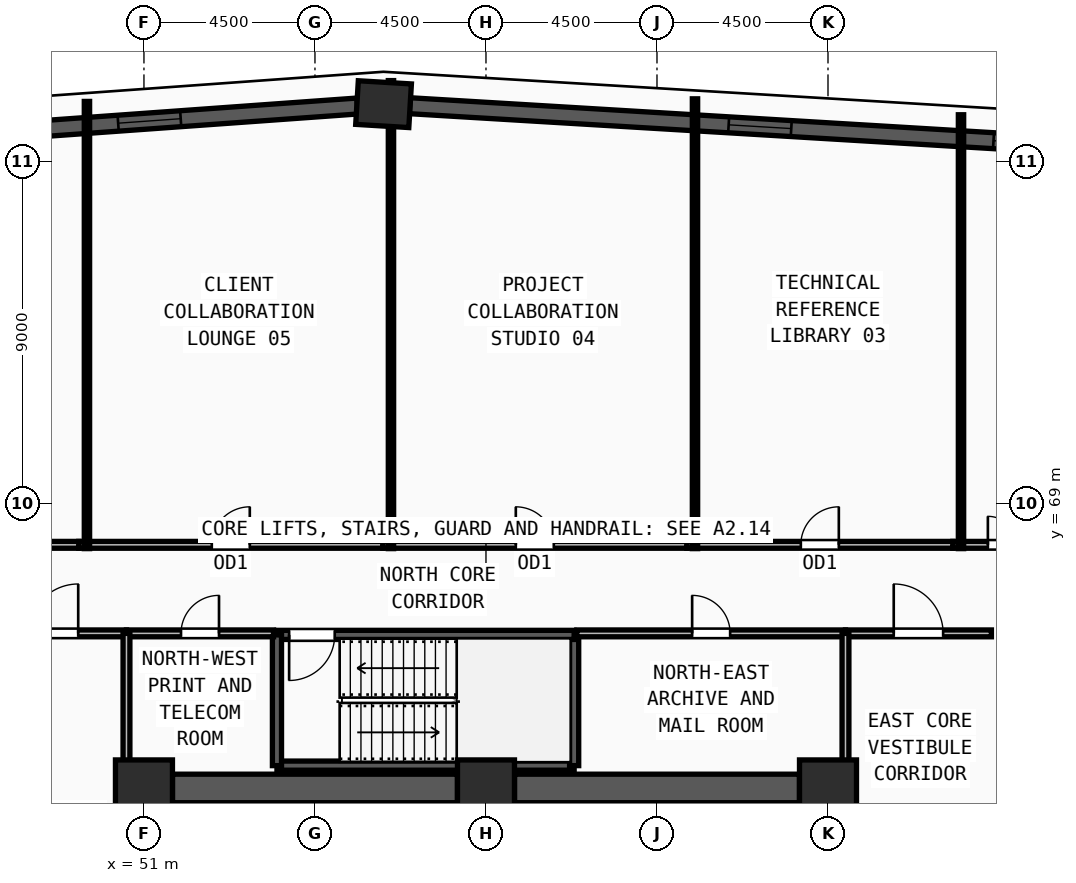
"""IFC4 building model, lengths in metres.
Left out: names, types, materials, properties, quantities, classifications, styles, units other than length and angle.
Written with IfcOpenShell. Run it as: python <this file> out.ifc"""

import sys

from ifc_helpers import new_model, si_unit, direction, frame, frame_2d, origin, origin_2d, place, context, subcontext, project, spatial, rectangle, extrude, source, transform, mapped, element, fill, save


model = new_model("IFC4")
c1 = context("Model", 3, precision=1e-05, world=origin(), true_north=direction((0.0, 1.0)))
c2 = subcontext(c1, "Body", "Model", "MODEL_VIEW")
j1 = project(units=[si_unit("LENGTHUNIT", "METRE"), si_unit("PLANEANGLEUNIT", "RADIAN")], contexts=[c1])
p1 = place(None, origin())
s1 = spatial("IfcSite", under=j1, at=p1, CompositionType="ELEMENT")
p2 = place(p1, origin())
s2 = spatial("IfcBuilding", under=s1, at=p2, CompositionType="ELEMENT")
p3 = place(p2, frame((0.0, 0.0, 155.25)))
s3 = spatial("IfcBuildingStorey", under=s2, at=p3, CompositionType="ELEMENT", Elevation=155.25)
m1 = source(origin(), c2, "Body", "SweptSolid", [
    extrude(rectangle(XDim=1.5, YDim=1.5, at=origin_2d()), origin(), (0.0, 0.0, 1.0), 3.75),
])
for number, where, z_axis, x_axis in (
    (1, (69.0, 61.5, 0.0), (0.0, 0.0, 1.0), (1.0, 0.0, 0.0)),
    (2, (60.0, 61.5, 0.0), (0.0, 0.0, 1.0), (1.0, 0.0, 0.0)),
    (3, (51.0, 61.5, 0.0), (0.0, 0.0, 1.0), (1.0, 0.0, 0.0)),
):
    element("IfcColumn", number, at=place(p3, frame(where, z_axis=z_axis, x_axis=x_axis)), inside=s3, PredefinedType="COLUMN", context=c2, shape_type="MappedRepresentation", body=[
        mapped(m1, transform((0.0, 0.0, 0.0), x_axis=(1.0, 0.0, 0.0), y_axis=(0.0, 1.0, 0.0), z_axis=(0.0, 0.0, 1.0), scale=1.0)),
    ])
m2 = source(origin(), c2, "Body", "SweptSolid", [
    extrude(rectangle(XDim=1.4, YDim=1.15, at=origin_2d()), origin(), (0.0, 0.0, 1.0), 3.75),
])
p4 = place(p3, frame((57.305, 79.505, 0.0), z_axis=(0.0, 0.0, 1.0), x_axis=(-0.998208638344, 0.059829042574, 0.0)))
e4 = element("IfcColumn", 4, at=p4, inside=s3, PredefinedType="COLUMN", context=c2, shape_type="MappedRepresentation", body=[
    mapped(m2, transform((0.0, 0.0, 0.0), x_axis=(1.0, 0.0, 0.0), y_axis=(0.0, 1.0, 0.0), z_axis=(0.0, 0.0, 1.0), scale=1.0)),
])
p5 = place(p3, frame((88.668, 77.626, 0.0), z_axis=(0.0, 0.0, 1.0), x_axis=(-0.998209336024, 0.059817401095, 0.0)))
e5 = element("IfcWall", 5, at=p5, inside=s3, PredefinedType="SOLIDWALL", context=c2, shape_type="SweptSolid", body=[
    extrude(rectangle(XDim=30.729, YDim=0.42, at=frame_2d((15.365, 0.0))), origin(), (0.0, 0.0, 1.0), 3.57),
])
m3 = source(origin(), c2, "Body", "SweptSolid", [
    extrude(rectangle(XDim=1.65, YDim=1.95, at=frame_2d((0.825, 0.975))), frame((0.0, 0.22, 0.0), z_axis=(0.0, -1.0, 0.0), x_axis=(1.0, 0.0, 0.0)), (0.0, 0.0, 1.0), 0.44),
])
p6 = place(p5, frame((6.857, 0.0, 0.55)))
e6 = element("IfcOpeningElement", 6, at=p6, cuts=e5, PredefinedType="OPENING", context=c2, shape_type="MappedRepresentation", body=[
    mapped(m3, transform((0.0, 0.0, 0.0), x_axis=(1.0, 0.0, 0.0), y_axis=(0.0, 1.0, 0.0), z_axis=(0.0, 0.0, 1.0), scale=1.0)),
])
p7 = place(p5, frame((13.69, 0.0, 0.55)))
e7 = element("IfcOpeningElement", 7, at=p7, cuts=e5, PredefinedType="OPENING", context=c2, shape_type="MappedRepresentation", body=[
    mapped(m3, transform((0.0, 0.0, 0.0), x_axis=(1.0, 0.0, 0.0), y_axis=(0.0, 1.0, 0.0), z_axis=(0.0, 0.0, 1.0), scale=1.0)),
])
p8 = place(p5, frame((20.672, 0.0, 0.55)))
e8 = element("IfcOpeningElement", 8, at=p8, cuts=e5, PredefinedType="OPENING", context=c2, shape_type="MappedRepresentation", body=[
    mapped(m3, transform((0.0, 0.0, 0.0), x_axis=(1.0, 0.0, 0.0), y_axis=(0.0, 1.0, 0.0), z_axis=(0.0, 0.0, 1.0), scale=1.0)),
])
p9 = place(p3, frame((56.617, 79.456, 0.0), z_axis=(0.0, 0.0, 1.0), x_axis=(-0.997433557859, -0.071598167967, 0.0)))
e9 = element("IfcWall", 9, at=p9, inside=s3, PredefinedType="SOLIDWALL", context=c2, shape_type="SweptSolid", body=[
    extrude(rectangle(XDim=25.349, YDim=0.42, at=frame_2d((12.674, 0.0))), origin(), (0.0, 0.0, 1.0), 3.57),
])
p10 = place(p9, frame((4.662, 0.0, 0.55)))
e10 = element("IfcOpeningElement", 10, at=p10, cuts=e9, PredefinedType="OPENING", context=c2, shape_type="MappedRepresentation", body=[
    mapped(m3, transform((0.0, 0.0, 0.0), x_axis=(1.0, 0.0, 0.0), y_axis=(0.0, 1.0, 0.0), z_axis=(0.0, 0.0, 1.0), scale=1.0)),
])
p11 = place(p9, frame((11.85, 0.0, 0.55)))
e11 = element("IfcOpeningElement", 11, at=p11, cuts=e9, PredefinedType="OPENING", context=c2, shape_type="MappedRepresentation", body=[
    mapped(m3, transform((0.0, 0.0, 0.0), x_axis=(1.0, 0.0, 0.0), y_axis=(0.0, 1.0, 0.0), z_axis=(0.0, 0.0, 1.0), scale=1.0)),
])
p12 = place(p9, frame((18.187, 0.0, 0.55)))
e12 = element("IfcOpeningElement", 12, at=p12, cuts=e9, PredefinedType="OPENING", context=c2, shape_type="MappedRepresentation", body=[
    mapped(m3, transform((0.0, 0.0, 0.0), x_axis=(1.0, 0.0, 0.0), y_axis=(0.0, 1.0, 0.0), z_axis=(0.0, 0.0, 1.0), scale=1.0)),
])
for number, where, z_axis, x_axis in (
    (13, (51.75, 61.5, 0.0), (0.0, 0.0, 1.0), (1.0, 0.0, 0.0)),
    (14, (60.75, 61.5, 0.0), (0.0, 0.0, 1.0), (1.0, 0.0, 0.0)),
):
    element("IfcWall", number, at=place(p3, frame(where, z_axis=z_axis, x_axis=x_axis)), inside=s3, PredefinedType="SHEAR", context=c2, shape_type="SweptSolid", body=[
        extrude(rectangle(XDim=7.5, YDim=0.75, at=frame_2d((3.75, 0.0))), origin(), (0.0, 0.0, 1.0), 3.57),
    ])
p13 = place(p3, frame((54.5, 62.1, 0.0), z_axis=(0.0, 0.0, 1.0), x_axis=(1.0, 0.0, 0.0)))
e15 = element("IfcWall", 15, at=p13, inside=s3, PredefinedType="SOLIDWALL", context=c2, shape_type="SweptSolid", body=[
    extrude(rectangle(XDim=7.82, YDim=0.24, at=frame_2d((3.91, 0.0))), origin(), (0.0, 0.0, 1.0), 3.57),
])
p14 = place(p3, frame((62.32, 62.1, 0.0), z_axis=(0.0, 0.0, 1.0), x_axis=(0.0, 1.0, 0.0)))
e16 = element("IfcWall", 16, at=p14, inside=s3, PredefinedType="SOLIDWALL", context=c2, shape_type="SweptSolid", body=[
    extrude(rectangle(XDim=3.44, YDim=0.24, at=frame_2d((1.72, 0.0))), origin(), (0.0, 0.0, 1.0), 3.57),
])
p15 = place(p3, frame((62.32, 65.54, 0.0), z_axis=(0.0, 0.0, 1.0), x_axis=(-1.0, 0.0, 0.0)))
e17 = element("IfcWall", 17, at=p15, inside=s3, PredefinedType="SOLIDWALL", context=c2, shape_type="SweptSolid", body=[
    extrude(rectangle(XDim=7.82, YDim=0.24, at=frame_2d((3.91, 0.0))), origin(), (0.0, 0.0, 1.0), 3.57),
])
m4 = source(origin(), c2, "Body", "SweptSolid", [
    extrude(rectangle(XDim=1.2, YDim=2.2, at=frame_2d((0.6, 1.1))), frame((0.0, 0.13, 0.0), z_axis=(0.0, -1.0, 0.0), x_axis=(1.0, 0.0, 0.0)), (0.0, 0.0, 1.0), 0.26),
])
p16 = place(p15, frame((6.3, 0.0, 0.0)))
e18 = element("IfcOpeningElement", 18, at=p16, cuts=e17, PredefinedType="OPENING", context=c2, shape_type="MappedRepresentation", body=[
    mapped(m4, transform((0.0, 0.0, 0.0), x_axis=(1.0, 0.0, 0.0), y_axis=(0.0, 1.0, 0.0), z_axis=(0.0, 0.0, 1.0), scale=1.0)),
])
p17 = place(p3, frame((54.5, 65.54, 0.0), z_axis=(0.0, 0.0, 1.0), x_axis=(0.0, -1.0, 0.0)))
e19 = element("IfcWall", 19, at=p17, inside=s3, PredefinedType="SOLIDWALL", context=c2, shape_type="SweptSolid", body=[
    extrude(rectangle(XDim=3.44, YDim=0.24, at=frame_2d((1.72, 0.0))), origin(), (0.0, 0.0, 1.0), 3.57),
])
p18 = place(p3, frame((50.54, 65.58, 0.0), z_axis=(0.0, 0.0, 1.0), x_axis=(1.0, 0.0, 0.0)))
e20 = element("IfcWall", 20, at=p18, inside=s3, PredefinedType="PARTITIONING", context=c2, shape_type="SweptSolid", body=[
    extrude(rectangle(XDim=3.87, YDim=0.18, at=frame_2d((1.935, 0.0))), origin(), (0.0, 0.0, 1.0), 3.57),
])
m5 = source(origin(), c2, "Body", "SweptSolid", [
    extrude(rectangle(XDim=1.0, YDim=2.2, at=frame_2d((0.5, 1.1))), frame((0.0, 0.1, 0.0), z_axis=(0.0, -1.0, 0.0), x_axis=(1.0, 0.0, 0.0)), (0.0, 0.0, 1.0), 0.2),
])
p19 = place(p18, frame((1.435, 0.0, 0.0)))
e21 = element("IfcOpeningElement", 21, at=p19, cuts=e20, PredefinedType="OPENING", context=c2, shape_type="MappedRepresentation", body=[
    mapped(m5, transform((0.0, 0.0, 0.0), x_axis=(1.0, 0.0, 0.0), y_axis=(0.0, 1.0, 0.0), z_axis=(0.0, 0.0, 1.0), scale=1.0)),
])
p20 = place(p3, frame((62.39, 65.58, 0.0), z_axis=(0.0, 0.0, 1.0), x_axis=(1.0, 0.0, 0.0)))
e22 = element("IfcWall", 22, at=p20, inside=s3, PredefinedType="PARTITIONING", context=c2, shape_type="SweptSolid", body=[
    extrude(rectangle(XDim=7.07, YDim=0.18, at=frame_2d((3.535, 0.0))), origin(), (0.0, 0.0, 1.0), 3.57),
])
p21 = place(p20, frame((3.035, 0.0, 0.0)))
e23 = element("IfcOpeningElement", 23, at=p21, cuts=e22, PredefinedType="OPENING", context=c2, shape_type="MappedRepresentation", body=[
    mapped(m5, transform((0.0, 0.0, 0.0), x_axis=(1.0, 0.0, 0.0), y_axis=(0.0, 1.0, 0.0), z_axis=(0.0, 0.0, 1.0), scale=1.0)),
])
p22 = place(p3, frame((46.7, 65.58, 0.0), z_axis=(0.0, 0.0, 1.0), x_axis=(1.0, 0.0, 0.0)))
e24 = element("IfcWall", 24, at=p22, inside=s3, PredefinedType="PARTITIONING", context=c2, shape_type="SweptSolid", body=[
    extrude(rectangle(XDim=3.84, YDim=0.18, at=frame_2d((1.92, 0.0))), origin(), (0.0, 0.0, 1.0), 3.57),
])
m6 = source(origin(), c2, "Body", "SweptSolid", [
    extrude(rectangle(XDim=1.3, YDim=2.2, at=frame_2d((0.65, 1.1))), frame((0.0, 0.1, 0.0), z_axis=(0.0, -1.0, 0.0), x_axis=(1.0, 0.0, 0.0)), (0.0, 0.0, 1.0), 0.2),
])
p23 = place(p22, frame((1.27, 0.0, 0.0)))
e25 = element("IfcOpeningElement", 25, at=p23, cuts=e24, PredefinedType="OPENING", context=c2, shape_type="MappedRepresentation", body=[
    mapped(m6, transform((0.0, 0.0, 0.0), x_axis=(1.0, 0.0, 0.0), y_axis=(0.0, 1.0, 0.0), z_axis=(0.0, 0.0, 1.0), scale=1.0)),
])
p24 = place(p3, frame((69.46, 65.58, 0.0), z_axis=(0.0, 0.0, 1.0), x_axis=(1.0, 0.0, 0.0)))
e26 = element("IfcWall", 26, at=p24, inside=s3, PredefinedType="PARTITIONING", context=c2, shape_type="SweptSolid", body=[
    extrude(rectangle(XDim=3.84, YDim=0.18, at=frame_2d((1.92, 0.0))), origin(), (0.0, 0.0, 1.0), 3.57),
])
p25 = place(p24, frame((1.27, 0.0, 0.0)))
e27 = element("IfcOpeningElement", 27, at=p25, cuts=e26, PredefinedType="OPENING", context=c2, shape_type="MappedRepresentation", body=[
    mapped(m6, transform((0.0, 0.0, 0.0), x_axis=(1.0, 0.0, 0.0), y_axis=(0.0, 1.0, 0.0), z_axis=(0.0, 0.0, 1.0), scale=1.0)),
])
p26 = place(p3, frame((72.285, 67.91, 0.0), z_axis=(0.0, 0.0, 1.0), x_axis=(1.0, 0.0, 0.0)))
e28 = element("IfcWall", 28, at=p26, inside=s3, PredefinedType="PARTITIONING", context=c2, shape_type="SweptSolid", body=[
    extrude(rectangle(XDim=3.345, YDim=0.18, at=frame_2d((1.672, 0.0))), origin(), (0.0, 0.0, 1.0), 3.57),
])
m7 = source(origin(), c2, "Body", "SweptSolid", [
    extrude(rectangle(XDim=1.5, YDim=2.2, at=frame_2d((0.75, 1.1))), frame((0.0, 0.1, 0.0), z_axis=(0.0, -1.0, 0.0), x_axis=(1.0, 0.0, 0.0)), (0.0, 0.0, 1.0), 0.2),
])
p27 = place(p26, frame((0.922, 0.0, 0.0)))
e29 = element("IfcOpeningElement", 29, at=p27, cuts=e28, PredefinedType="OPENING", context=c2, shape_type="MappedRepresentation", body=[
    mapped(m7, transform((0.0, 0.0, 0.0), x_axis=(1.0, 0.0, 0.0), y_axis=(0.0, 1.0, 0.0), z_axis=(0.0, 0.0, 1.0), scale=1.0)),
])
p28 = place(p3, frame((65.285, 67.91, 0.0), z_axis=(0.0, 0.0, 1.0), x_axis=(1.0, 0.0, 0.0)))
e30 = element("IfcWall", 30, at=p28, inside=s3, PredefinedType="PARTITIONING", context=c2, shape_type="SweptSolid", body=[
    extrude(rectangle(XDim=7.0, YDim=0.18, at=frame_2d((3.5, 0.0))), origin(), (0.0, 0.0, 1.0), 3.57),
])
p29 = place(p28, frame((3.0, 0.0, 0.0)))
e31 = element("IfcOpeningElement", 31, at=p29, cuts=e30, PredefinedType="OPENING", context=c2, shape_type="MappedRepresentation", body=[
    mapped(m5, transform((0.0, 0.0, 0.0), x_axis=(1.0, 0.0, 0.0), y_axis=(0.0, 1.0, 0.0), z_axis=(0.0, 0.0, 1.0), scale=1.0)),
])
p30 = place(p3, frame((57.285, 67.91, 0.0), z_axis=(0.0, 0.0, 1.0), x_axis=(1.0, 0.0, 0.0)))
e32 = element("IfcWall", 32, at=p30, inside=s3, PredefinedType="PARTITIONING", context=c2, shape_type="SweptSolid", body=[
    extrude(rectangle(XDim=8.0, YDim=0.18, at=frame_2d((4.0, 0.0))), origin(), (0.0, 0.0, 1.0), 3.57),
])
p31 = place(p30, frame((3.5, 0.0, 0.0)))
e33 = element("IfcOpeningElement", 33, at=p31, cuts=e32, PredefinedType="OPENING", context=c2, shape_type="MappedRepresentation", body=[
    mapped(m5, transform((0.0, 0.0, 0.0), x_axis=(1.0, 0.0, 0.0), y_axis=(0.0, 1.0, 0.0), z_axis=(0.0, 0.0, 1.0), scale=1.0)),
])
p32 = place(p3, frame((49.285, 67.91, 0.0), z_axis=(0.0, 0.0, 1.0), x_axis=(1.0, 0.0, 0.0)))
e34 = element("IfcWall", 34, at=p32, inside=s3, PredefinedType="PARTITIONING", context=c2, shape_type="SweptSolid", body=[
    extrude(rectangle(XDim=8.0, YDim=0.18, at=frame_2d((4.0, 0.0))), origin(), (0.0, 0.0, 1.0), 3.57),
])
p33 = place(p32, frame((3.5, 0.0, 0.0)))
e35 = element("IfcOpeningElement", 35, at=p33, cuts=e34, PredefinedType="OPENING", context=c2, shape_type="MappedRepresentation", body=[
    mapped(m5, transform((0.0, 0.0, 0.0), x_axis=(1.0, 0.0, 0.0), y_axis=(0.0, 1.0, 0.0), z_axis=(0.0, 0.0, 1.0), scale=1.0)),
])
p34 = place(p3, frame((44.37, 67.91, 0.0), z_axis=(0.0, 0.0, 1.0), x_axis=(1.0, 0.0, 0.0)))
e36 = element("IfcWall", 36, at=p34, inside=s3, PredefinedType="PARTITIONING", context=c2, shape_type="SweptSolid", body=[
    extrude(rectangle(XDim=4.915, YDim=0.18, at=frame_2d((2.458, 0.0))), origin(), (0.0, 0.0, 1.0), 3.57),
])
p35 = place(p34, frame((1.707, 0.0, 0.0)))
e37 = element("IfcOpeningElement", 37, at=p35, cuts=e36, PredefinedType="OPENING", context=c2, shape_type="MappedRepresentation", body=[
    mapped(m7, transform((0.0, 0.0, 0.0), x_axis=(1.0, 0.0, 0.0), y_axis=(0.0, 1.0, 0.0), z_axis=(0.0, 0.0, 1.0), scale=1.0)),
])
for number, where, z_axis, x_axis in (
    (38, (50.54, 61.95, 0.0), (0.0, 0.0, 1.0), (0.0, 1.0, 0.0)),
    (39, (69.46, 61.95, 0.0), (0.0, 0.0, 1.0), (0.0, 1.0, 0.0)),
):
    element("IfcWall", number, at=place(p3, frame(where, z_axis=z_axis, x_axis=x_axis)), inside=s3, PredefinedType="PARTITIONING", context=c2, shape_type="SweptSolid", body=[
        extrude(rectangle(XDim=3.63, YDim=0.18, at=frame_2d((1.815, 0.0))), origin(), (0.0, 0.0, 1.0), 3.57),
    ])
p36 = place(p3, frame((49.5, 67.81, 0.0), z_axis=(0.0, 0.0, 1.0), x_axis=(0.0, 1.0, 0.0)))
e40 = element("IfcWall", 40, at=p36, inside=s3, PredefinedType="PARTITIONING", context=c2, shape_type="SweptSolid", body=[
    extrude(rectangle(XDim=11.767, YDim=0.14, at=frame_2d((5.883, 0.0))), origin(), (0.0, 0.0, 1.0), 3.57),
])
p37 = place(p3, frame((57.5, 67.81, 0.0), z_axis=(0.0, 0.0, 1.0), x_axis=(0.0, 1.0, 0.0)))
e41 = element("IfcWall", 41, at=p37, inside=s3, PredefinedType="PARTITIONING", context=c2, shape_type="SweptSolid", body=[
    extrude(rectangle(XDim=12.315, YDim=0.14, at=frame_2d((6.157, 0.0))), origin(), (0.0, 0.0, 1.0), 3.57),
])
p38 = place(p3, frame((65.5, 67.81, 0.0), z_axis=(0.0, 0.0, 1.0), x_axis=(0.0, 1.0, 0.0)))
e42 = element("IfcWall", 42, at=p38, inside=s3, PredefinedType="PARTITIONING", context=c2, shape_type="SweptSolid", body=[
    extrude(rectangle(XDim=11.835, YDim=0.14, at=frame_2d((5.917, 0.0))), origin(), (0.0, 0.0, 1.0), 3.57),
])
p39 = place(p3, frame((72.5, 67.81, 0.0), z_axis=(0.0, 0.0, 1.0), x_axis=(0.0, 1.0, 0.0)))
e43 = element("IfcWall", 43, at=p39, inside=s3, PredefinedType="PARTITIONING", context=c2, shape_type="SweptSolid", body=[
    extrude(rectangle(XDim=11.416, YDim=0.14, at=frame_2d((5.708, 0.0))), origin(), (0.0, 0.0, 1.0), 3.57),
])
m8 = source(origin(), c2, "Body", "SweptSolid", [
    extrude(rectangle(XDim=1.65, YDim=1.95, at=frame_2d((0.825, 0.975))), frame((0.0, 0.03, 0.0), z_axis=(0.0, -1.0, 0.0), x_axis=(1.0, 0.0, 0.0)), (0.0, 0.0, 1.0), 0.06),
])
p40 = place(p7, origin())
e44 = element("IfcWindow", 44, at=p40, inside=s3, PartitioningType="DOUBLE_PANEL_VERTICAL", PredefinedType="WINDOW", context=c2, shape_type="MappedRepresentation", body=[
    mapped(m8, transform((0.0, 0.0, 0.0), x_axis=(1.0, 0.0, 0.0), y_axis=(0.0, 1.0, 0.0), z_axis=(0.0, 0.0, 1.0), scale=1.0)),
])
fill(e7, e44)
p41 = place(p8, origin())
e45 = element("IfcWindow", 45, at=p41, inside=s3, PartitioningType="DOUBLE_PANEL_VERTICAL", PredefinedType="WINDOW", context=c2, shape_type="MappedRepresentation", body=[
    mapped(m8, transform((0.0, 0.0, 0.0), x_axis=(1.0, 0.0, 0.0), y_axis=(0.0, 1.0, 0.0), z_axis=(0.0, 0.0, 1.0), scale=1.0)),
])
fill(e8, e45)
p42 = place(p10, origin())
e46 = element("IfcWindow", 46, at=p42, inside=s3, PartitioningType="DOUBLE_PANEL_VERTICAL", PredefinedType="WINDOW", context=c2, shape_type="MappedRepresentation", body=[
    mapped(m8, transform((0.0, 0.0, 0.0), x_axis=(1.0, 0.0, 0.0), y_axis=(0.0, 1.0, 0.0), z_axis=(0.0, 0.0, 1.0), scale=1.0)),
])
fill(e10, e46)
m9 = source(origin(), c2, "Body", "SweptSolid", [
    extrude(rectangle(XDim=1.2, YDim=2.2, at=frame_2d((0.6, 1.1))), frame((0.0, 0.025, 0.0), z_axis=(0.0, -1.0, 0.0), x_axis=(1.0, 0.0, 0.0)), (0.0, 0.0, 1.0), 0.05),
])
p43 = place(p16, origin())
e47 = element("IfcDoor", 47, at=p43, inside=s3, OperationType="SINGLE_SWING_RIGHT", PredefinedType="DOOR", context=c2, shape_type="MappedRepresentation", body=[
    mapped(m9, transform((0.0, 0.0, 0.0), x_axis=(1.0, 0.0, 0.0), y_axis=(0.0, 1.0, 0.0), z_axis=(0.0, 0.0, 1.0), scale=1.0)),
])
fill(e18, e47)
m10 = source(origin(), c2, "Body", "SweptSolid", [
    extrude(rectangle(XDim=1.0, YDim=2.2, at=frame_2d((0.5, 1.1))), frame((0.0, 0.025, 0.0), z_axis=(0.0, -1.0, 0.0), x_axis=(1.0, 0.0, 0.0)), (0.0, 0.0, 1.0), 0.05),
])
p44 = place(p19, origin())
e48 = element("IfcDoor", 48, at=p44, inside=s3, OperationType="SINGLE_SWING_RIGHT", PredefinedType="DOOR", context=c2, shape_type="MappedRepresentation", body=[
    mapped(m10, transform((0.0, 0.0, 0.0), x_axis=(1.0, 0.0, 0.0), y_axis=(0.0, 1.0, 0.0), z_axis=(0.0, 0.0, 1.0), scale=1.0)),
])
fill(e21, e48)
p45 = place(p21, origin())
e49 = element("IfcDoor", 49, at=p45, inside=s3, OperationType="SINGLE_SWING_LEFT", PredefinedType="DOOR", context=c2, shape_type="MappedRepresentation", body=[
    mapped(m10, transform((0.0, 0.0, 0.0), x_axis=(1.0, 0.0, 0.0), y_axis=(0.0, 1.0, 0.0), z_axis=(0.0, 0.0, 1.0), scale=1.0)),
])
fill(e23, e49)
m11 = source(origin(), c2, "Body", "SweptSolid", [
    extrude(rectangle(XDim=1.3, YDim=2.2, at=frame_2d((0.65, 1.1))), frame((0.0, 0.025, 0.0), z_axis=(0.0, -1.0, 0.0), x_axis=(1.0, 0.0, 0.0)), (0.0, 0.0, 1.0), 0.05),
])
p46 = place(p23, origin())
e50 = element("IfcDoor", 50, at=p46, inside=s3, OperationType="SINGLE_SWING_RIGHT", PredefinedType="DOOR", context=c2, shape_type="MappedRepresentation", body=[
    mapped(m11, transform((0.0, 0.0, 0.0), x_axis=(1.0, 0.0, 0.0), y_axis=(0.0, 1.0, 0.0), z_axis=(0.0, 0.0, 1.0), scale=1.0)),
])
fill(e25, e50)
p47 = place(p25, origin())
e51 = element("IfcDoor", 51, at=p47, inside=s3, OperationType="SINGLE_SWING_LEFT", PredefinedType="DOOR", context=c2, shape_type="MappedRepresentation", body=[
    mapped(m11, transform((0.0, 0.0, 0.0), x_axis=(1.0, 0.0, 0.0), y_axis=(0.0, 1.0, 0.0), z_axis=(0.0, 0.0, 1.0), scale=1.0)),
])
fill(e27, e51)
m12 = source(origin(), c2, "Body", "SweptSolid", [
    extrude(rectangle(XDim=1.5, YDim=2.2, at=frame_2d((0.75, 1.1))), frame((0.0, 0.025, 0.0), z_axis=(0.0, -1.0, 0.0), x_axis=(1.0, 0.0, 0.0)), (0.0, 0.0, 1.0), 0.05),
])
p48 = place(p27, origin())
e52 = element("IfcDoor", 52, at=p48, inside=s3, OperationType="DOUBLE_DOOR_SINGLE_SWING", PredefinedType="DOOR", context=c2, shape_type="MappedRepresentation", body=[
    mapped(m12, transform((0.0, 0.0, 0.0), x_axis=(1.0, 0.0, 0.0), y_axis=(0.0, 1.0, 0.0), z_axis=(0.0, 0.0, 1.0), scale=1.0)),
])
fill(e29, e52)
p49 = place(p29, origin())
e53 = element("IfcDoor", 53, at=p49, inside=s3, OperationType="SINGLE_SWING_RIGHT", PredefinedType="DOOR", context=c2, shape_type="MappedRepresentation", body=[
    mapped(m10, transform((0.0, 0.0, 0.0), x_axis=(1.0, 0.0, 0.0), y_axis=(0.0, 1.0, 0.0), z_axis=(0.0, 0.0, 1.0), scale=1.0)),
])
fill(e31, e53)
p50 = place(p31, origin())
e54 = element("IfcDoor", 54, at=p50, inside=s3, OperationType="SINGLE_SWING_LEFT", PredefinedType="DOOR", context=c2, shape_type="MappedRepresentation", body=[
    mapped(m10, transform((0.0, 0.0, 0.0), x_axis=(1.0, 0.0, 0.0), y_axis=(0.0, 1.0, 0.0), z_axis=(0.0, 0.0, 1.0), scale=1.0)),
])
fill(e33, e54)
p51 = place(p33, origin())
e55 = element("IfcDoor", 55, at=p51, inside=s3, OperationType="SINGLE_SWING_RIGHT", PredefinedType="DOOR", context=c2, shape_type="MappedRepresentation", body=[
    mapped(m10, transform((0.0, 0.0, 0.0), x_axis=(1.0, 0.0, 0.0), y_axis=(0.0, 1.0, 0.0), z_axis=(0.0, 0.0, 1.0), scale=1.0)),
])
fill(e35, e55)
save(model, sys.argv[1])
